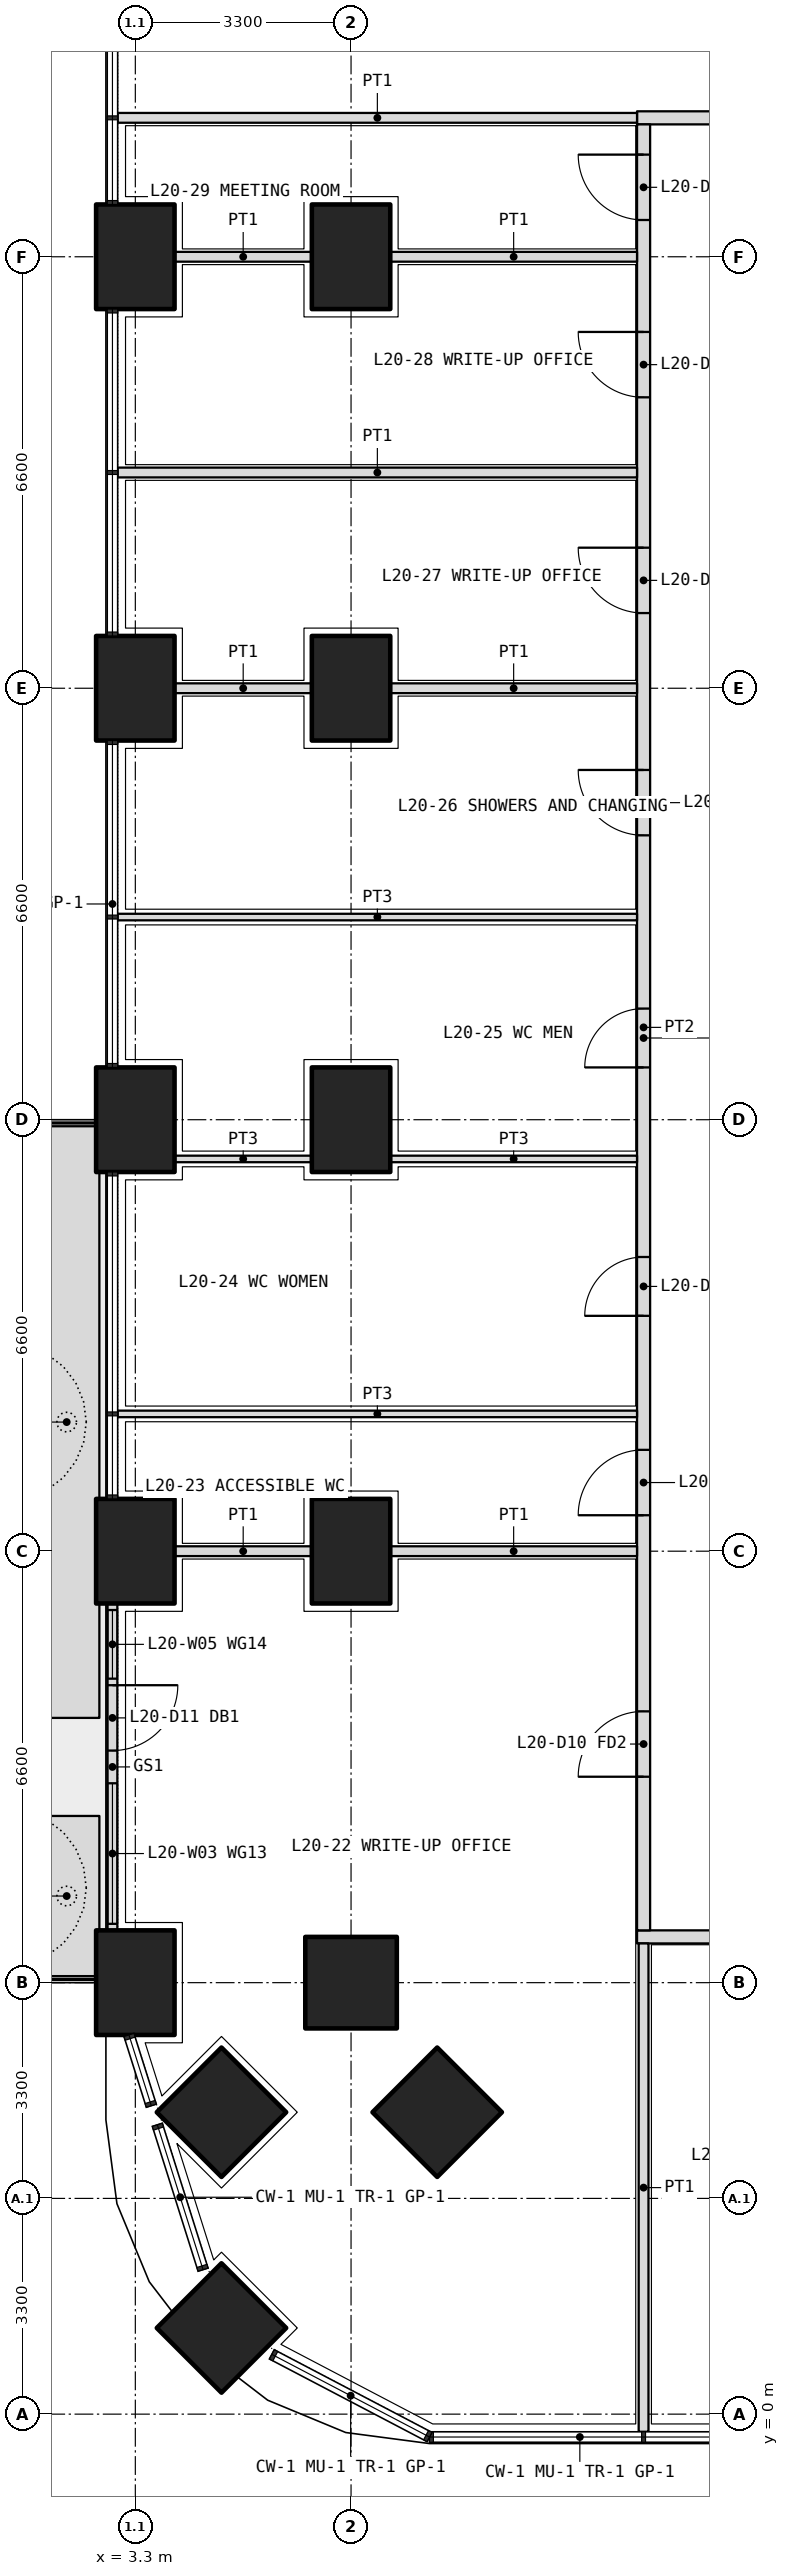
"""IFC4 building model, lengths in metres.
Left out: names, types, materials, properties, quantities, classifications, styles, units other than length and angle.
Written with IfcOpenShell. Run it as: python <this file> out.ifc"""

import sys

from ifc_helpers import new_model, si_unit, direction, frame, frame_2d, origin, origin_2d, place, context, subcontext, project, spatial, polyline, rectangle, outline, extrude, element, fill, save


model = new_model("IFC4")
c1 = context("Model", 3, precision=1e-05, world=origin(), true_north=direction((0.0, 1.0)))
c2 = subcontext(c1, "Body", "Model", "MODEL_VIEW")
j1 = project(units=[si_unit("LENGTHUNIT", "METRE"), si_unit("PLANEANGLEUNIT", "RADIAN")], contexts=[c1])
p1 = place(None, origin())
s1 = spatial("IfcSite", under=j1, at=p1, CompositionType="ELEMENT")
p2 = place(p1, origin())
s2 = spatial("IfcBuilding", under=s1, at=p2, CompositionType="ELEMENT")
p3 = place(p2, frame((0.0, 0.0, 90.6)))
s3 = spatial("IfcBuildingStorey", under=s2, at=p3, CompositionType="ELEMENT", Elevation=90.6)
p4 = place(p3, frame((4.618, 1.318, 0.0), z_axis=(0.0, 0.0, 1.0), x_axis=(0.707106781187, 0.707106781187, 0.0)))
e1 = element("IfcColumn", 1, at=p4, inside=s3, PredefinedType="COLUMN", context=c2, shape_type="SweptSolid", body=[
    extrude(rectangle(XDim=1.4, YDim=1.4, at=origin_2d()), origin(), (0.0, 0.0, 1.0), 4.2),
])
for number, where, z_axis, x_axis in (
    (2, (3.3, 6.6, 0.0), (0.0, 0.0, 1.0), (0.0, 1.0, 0.0)),
    (3, (3.3, 13.2, 0.0), (0.0, 0.0, 1.0), (0.0, 1.0, 0.0)),
    (4, (3.3, 19.8, 0.0), (0.0, 0.0, 1.0), (0.0, 1.0, 0.0)),
    (5, (3.3, 26.4, 0.0), (0.0, 0.0, 1.0), (0.0, 1.0, 0.0)),
    (6, (3.3, 33.0, 0.0), (0.0, 0.0, 1.0), (0.0, 1.0, 0.0)),
):
    element("IfcColumn", number, at=place(p3, frame(where, z_axis=z_axis, x_axis=x_axis)), inside=s3, PredefinedType="COLUMN", context=c2, shape_type="SweptSolid", body=[
        extrude(rectangle(XDim=1.6, YDim=1.2, at=origin_2d()), origin(), (0.0, 0.0, 1.0), 4.2),
    ])
for number, where, z_axis, x_axis in (
    (7, (6.6, 6.6, 0.0), (0.0, 0.0, 1.0), (1.0, 0.0, 0.0)),
    (8, (4.618, 4.618, 0.0), (0.0, 0.0, 1.0), (0.707, 0.707, 0.0)),
    (9, (7.918, 4.618, 0.0), (0.0, 0.0, 1.0), (0.707, 0.707, 0.0)),
):
    element("IfcColumn", number, at=place(p3, frame(where, z_axis=z_axis, x_axis=x_axis)), inside=s3, PredefinedType="COLUMN", context=c2, shape_type="SweptSolid", body=[
        extrude(rectangle(XDim=1.4, YDim=1.4, at=origin_2d()), origin(), (0.0, 0.0, 1.0), 4.2),
    ])
for number, where, z_axis, x_axis in (
    (10, (6.6, 13.2, 0.0), (0.0, 0.0, 1.0), (0.0, 1.0, 0.0)),
    (11, (6.6, 19.8, 0.0), (0.0, 0.0, 1.0), (0.0, 1.0, 0.0)),
    (12, (6.6, 26.4, 0.0), (0.0, 0.0, 1.0), (0.0, 1.0, 0.0)),
    (13, (6.6, 33.0, 0.0), (0.0, 0.0, 1.0), (0.0, 1.0, 0.0)),
):
    element("IfcColumn", number, at=place(p3, frame(where, z_axis=z_axis, x_axis=x_axis)), inside=s3, PredefinedType="COLUMN", context=c2, shape_type="SweptSolid", body=[
        extrude(rectangle(XDim=1.6, YDim=1.2, at=origin_2d()), origin(), (0.0, 0.0, 1.0), 4.2),
    ])
p5 = place(p3, origin())
e14 = element("IfcWall", 14, at=p5, inside=s3, PredefinedType="USERDEFINED", context=c2, shape_type="SweptSolid", body=[
    extrude(outline(polyline([(1.75, 6.7), (2.75, 6.7), (2.75, 9.15), (1.75, 9.15), (1.75, 6.7)]), holes=[polyline([(1.9, 6.85), (2.6, 6.85), (2.6, 9.0), (1.9, 9.0), (1.9, 6.85)])]), origin(), (0.0, 0.0, 1.0), 1.05),
])
p6 = place(p3, origin())
e15 = element("IfcWall", 15, at=p6, inside=s3, PredefinedType="USERDEFINED", context=c2, shape_type="SweptSolid", body=[
    extrude(outline(polyline([(1.75, 10.65), (2.75, 10.65), (2.75, 19.7), (1.75, 19.7), (1.75, 10.65)]), holes=[polyline([(1.9, 10.8), (2.6, 10.8), (2.6, 19.55), (1.9, 19.55), (1.9, 10.8)])]), origin(), (0.0, 0.0, 1.0), 1.05),
])
p7 = place(p3, frame((2.95, 12.4, 0.0), z_axis=(0.0, 0.0, 1.0), x_axis=(0.0, -1.0, 0.0)))
e16 = element("IfcWall", 16, at=p7, inside=s3, PredefinedType="SOLIDWALL", context=c2, shape_type="SweptSolid", body=[
    extrude(rectangle(XDim=5.0, YDim=0.15, at=frame_2d((2.5, 0.0))), origin(), (0.0, 0.0, 1.0), 2.7),
])
p8 = place(p7, frame((1.25, 0.0, 0.0)))
e17 = element("IfcOpeningElement", 17, at=p8, cuts=e16, PredefinedType="OPENING", context=c2, shape_type="SweptSolid", body=[
    extrude(rectangle(XDim=1.0, YDim=2.4, at=frame_2d((0.5, 1.2))), frame((0.0, 0.085, 0.0), z_axis=(0.0, -1.0, 0.0), x_axis=(1.0, 0.0, 0.0)), (0.0, 0.0, 1.0), 0.17),
])
p9 = place(p7, frame((0.1, 0.0, 0.1)))
e18 = element("IfcOpeningElement", 18, at=p9, cuts=e16, PredefinedType="OPENING", context=c2, shape_type="SweptSolid", body=[
    extrude(rectangle(XDim=1.05, YDim=2.3, at=frame_2d((0.525, 1.15))), frame((0.0, 0.085, 0.0), z_axis=(0.0, -1.0, 0.0), x_axis=(1.0, 0.0, 0.0)), (0.0, 0.0, 1.0), 0.17),
])
p10 = place(p7, frame((2.75, 0.0, 0.1)))
e19 = element("IfcOpeningElement", 19, at=p10, cuts=e16, PredefinedType="OPENING", context=c2, shape_type="SweptSolid", body=[
    extrude(rectangle(XDim=2.15, YDim=2.3, at=frame_2d((1.075, 1.15))), frame((0.0, 0.085, 0.0), z_axis=(0.0, -1.0, 0.0), x_axis=(1.0, 0.0, 0.0)), (0.0, 0.0, 1.0), 0.17),
])
p11 = place(p3, frame((10.975, 7.3, 0.0), z_axis=(0.0, 0.0, 1.0), x_axis=(1.0, 0.0, 0.0)))
e20 = element("IfcWall", 20, at=p11, inside=s3, PredefinedType="PARTITIONING", context=c2, shape_type="SweptSolid", body=[
    extrude(rectangle(XDim=12.125, YDim=0.2, at=frame_2d((6.062, 0.0))), origin(), (0.0, 0.0, 1.0), 2.85),
])
p12 = place(p11, frame((2.312, 0.0, 0.0)))
e21 = element("IfcOpeningElement", 21, at=p12, cuts=e20, PredefinedType="OPENING", context=c2, shape_type="SweptSolid", body=[
    extrude(rectangle(XDim=1.0, YDim=2.1, at=frame_2d((0.5, 1.05))), frame((0.0, 0.11, 0.0), z_axis=(0.0, -1.0, 0.0), x_axis=(1.0, 0.0, 0.0)), (0.0, 0.0, 1.0), 0.22),
])
p13 = place(p11, frame((7.125, 0.0, 0.0)))
e22 = element("IfcOpeningElement", 22, at=p13, cuts=e20, PredefinedType="OPENING", context=c2, shape_type="SweptSolid", body=[
    extrude(rectangle(XDim=1.0, YDim=2.1, at=frame_2d((0.5, 1.05))), frame((0.0, 0.11, 0.0), z_axis=(0.0, -1.0, 0.0), x_axis=(1.0, 0.0, 0.0)), (0.0, 0.0, 1.0), 0.22),
])
p14 = place(p11, frame((10.425, 0.0, 0.0)))
e23 = element("IfcOpeningElement", 23, at=p14, cuts=e20, PredefinedType="OPENING", context=c2, shape_type="SweptSolid", body=[
    extrude(rectangle(XDim=1.0, YDim=2.1, at=frame_2d((0.5, 1.05))), frame((0.0, 0.11, 0.0), z_axis=(0.0, -1.0, 0.0), x_axis=(1.0, 0.0, 0.0)), (0.0, 0.0, 1.0), 0.22),
])
p15 = place(p3, frame((10.975, 35.125, 0.0), z_axis=(0.0, 0.0, 1.0), x_axis=(1.0, 0.0, 0.0)))
e24 = element("IfcWall", 24, at=p15, inside=s3, PredefinedType="PARTITIONING", context=c2, shape_type="SweptSolid", body=[
    extrude(rectangle(XDim=30.85, YDim=0.2, at=frame_2d((15.425, 0.0))), origin(), (0.0, 0.0, 1.0), 2.85),
])
p16 = place(p15, frame((3.962, 0.0, 0.0)))
e25 = element("IfcOpeningElement", 25, at=p16, cuts=e24, PredefinedType="OPENING", context=c2, shape_type="SweptSolid", body=[
    extrude(rectangle(XDim=1.0, YDim=2.1, at=frame_2d((0.5, 1.05))), frame((0.0, 0.11, 0.0), z_axis=(0.0, -1.0, 0.0), x_axis=(1.0, 0.0, 0.0)), (0.0, 0.0, 1.0), 0.22),
])
p17 = place(p15, frame((9.975, 0.0, 0.0)))
e26 = element("IfcOpeningElement", 26, at=p17, cuts=e24, PredefinedType="OPENING", context=c2, shape_type="SweptSolid", body=[
    extrude(rectangle(XDim=1.0, YDim=2.1, at=frame_2d((0.5, 1.05))), frame((0.0, 0.11, 0.0), z_axis=(0.0, -1.0, 0.0), x_axis=(1.0, 0.0, 0.0)), (0.0, 0.0, 1.0), 0.22),
])
p18 = place(p15, frame((14.825, 0.0, 0.0)))
e27 = element("IfcOpeningElement", 27, at=p18, cuts=e24, PredefinedType="OPENING", context=c2, shape_type="SweptSolid", body=[
    extrude(rectangle(XDim=1.2, YDim=2.1, at=frame_2d((0.6, 1.05))), frame((0.0, 0.11, 0.0), z_axis=(0.0, -1.0, 0.0), x_axis=(1.0, 0.0, 0.0)), (0.0, 0.0, 1.0), 0.22),
])
p19 = place(p15, frame((24.238, 0.0, 0.0)))
e28 = element("IfcOpeningElement", 28, at=p19, cuts=e24, PredefinedType="OPENING", context=c2, shape_type="SweptSolid", body=[
    extrude(rectangle(XDim=1.0, YDim=2.1, at=frame_2d((0.5, 1.05))), frame((0.0, 0.11, 0.0), z_axis=(0.0, -1.0, 0.0), x_axis=(1.0, 0.0, 0.0)), (0.0, 0.0, 1.0), 0.22),
])
p20 = place(p3, frame((11.075, 7.4, 0.0), z_axis=(0.0, 0.0, 1.0), x_axis=(0.0, 1.0, 0.0)))
e29 = element("IfcWall", 29, at=p20, inside=s3, PredefinedType="PARTITIONING", context=c2, shape_type="SweptSolid", body=[
    extrude(rectangle(XDim=27.625, YDim=0.2, at=frame_2d((13.812, 0.0))), origin(), (0.0, 0.0, 1.0), 2.85),
])
p21 = place(p20, frame((2.35, 0.0, 0.0)))
e30 = element("IfcOpeningElement", 30, at=p21, cuts=e29, PredefinedType="OPENING", context=c2, shape_type="SweptSolid", body=[
    extrude(rectangle(XDim=1.0, YDim=2.1, at=frame_2d((0.5, 1.05))), frame((0.0, 0.11, 0.0), z_axis=(0.0, -1.0, 0.0), x_axis=(1.0, 0.0, 0.0)), (0.0, 0.0, 1.0), 0.22),
])
p22 = place(p20, frame((6.35, 0.0, 0.0)))
e31 = element("IfcOpeningElement", 31, at=p22, cuts=e29, PredefinedType="OPENING", context=c2, shape_type="SweptSolid", body=[
    extrude(rectangle(XDim=1.0, YDim=2.1, at=frame_2d((0.5, 1.05))), frame((0.0, 0.11, 0.0), z_axis=(0.0, -1.0, 0.0), x_axis=(1.0, 0.0, 0.0)), (0.0, 0.0, 1.0), 0.22),
])
p23 = place(p20, frame((9.4, 0.0, 0.0)))
e32 = element("IfcOpeningElement", 32, at=p23, cuts=e29, PredefinedType="OPENING", context=c2, shape_type="SweptSolid", body=[
    extrude(rectangle(XDim=0.9, YDim=2.1, at=frame_2d((0.45, 1.05))), frame((0.0, 0.11, 0.0), z_axis=(0.0, -1.0, 0.0), x_axis=(1.0, 0.0, 0.0)), (0.0, 0.0, 1.0), 0.22),
])
p24 = place(p20, frame((13.2, 0.0, 0.0)))
e33 = element("IfcOpeningElement", 33, at=p24, cuts=e29, PredefinedType="OPENING", context=c2, shape_type="SweptSolid", body=[
    extrude(rectangle(XDim=0.9, YDim=2.1, at=frame_2d((0.45, 1.05))), frame((0.0, 0.11, 0.0), z_axis=(0.0, -1.0, 0.0), x_axis=(1.0, 0.0, 0.0)), (0.0, 0.0, 1.0), 0.22),
])
p25 = place(p20, frame((16.75, 0.0, 0.0)))
e34 = element("IfcOpeningElement", 34, at=p25, cuts=e29, PredefinedType="OPENING", context=c2, shape_type="SweptSolid", body=[
    extrude(rectangle(XDim=1.0, YDim=2.1, at=frame_2d((0.5, 1.05))), frame((0.0, 0.11, 0.0), z_axis=(0.0, -1.0, 0.0), x_axis=(1.0, 0.0, 0.0)), (0.0, 0.0, 1.0), 0.22),
])
p26 = place(p20, frame((20.15, 0.0, 0.0)))
e35 = element("IfcOpeningElement", 35, at=p26, cuts=e29, PredefinedType="OPENING", context=c2, shape_type="SweptSolid", body=[
    extrude(rectangle(XDim=1.0, YDim=2.1, at=frame_2d((0.5, 1.05))), frame((0.0, 0.11, 0.0), z_axis=(0.0, -1.0, 0.0), x_axis=(1.0, 0.0, 0.0)), (0.0, 0.0, 1.0), 0.22),
])
p27 = place(p20, frame((23.45, 0.0, 0.0)))
e36 = element("IfcOpeningElement", 36, at=p27, cuts=e29, PredefinedType="OPENING", context=c2, shape_type="SweptSolid", body=[
    extrude(rectangle(XDim=1.0, YDim=2.1, at=frame_2d((0.5, 1.05))), frame((0.0, 0.11, 0.0), z_axis=(0.0, -1.0, 0.0), x_axis=(1.0, 0.0, 0.0)), (0.0, 0.0, 1.0), 0.22),
])
p28 = place(p20, frame((26.163, 0.0, 0.0)))
e37 = element("IfcOpeningElement", 37, at=p28, cuts=e29, PredefinedType="OPENING", context=c2, shape_type="SweptSolid", body=[
    extrude(rectangle(XDim=1.0, YDim=2.1, at=frame_2d((0.5, 1.05))), frame((0.0, 0.11, 0.0), z_axis=(0.0, -1.0, 0.0), x_axis=(1.0, 0.0, 0.0)), (0.0, 0.0, 1.0), 0.22),
])
p29 = place(p3, frame((11.075, -0.27, 0.0), z_axis=(0.0, 0.0, 1.0), x_axis=(0.0, 1.0, 0.0)))
e38 = element("IfcWall", 38, at=p29, inside=s3, PredefinedType="PARTITIONING", context=c2, shape_type="SweptSolid", body=[
    extrude(rectangle(XDim=7.47, YDim=0.15, at=frame_2d((3.735, 0.0))), origin(), (0.0, 0.0, 1.0), 2.7),
])
p30 = place(p3, frame((3.03, 35.125, 0.0), z_axis=(0.0, 0.0, 1.0), x_axis=(1.0, 0.0, 0.0)))
e39 = element("IfcWall", 39, at=p30, inside=s3, PredefinedType="PARTITIONING", context=c2, shape_type="SweptSolid", body=[
    extrude(rectangle(XDim=7.945, YDim=0.15, at=frame_2d((3.973, 0.0))), origin(), (0.0, 0.0, 1.0), 2.7),
])
p31 = place(p3, frame((3.03, 15.3, 0.0), z_axis=(0.0, 0.0, 1.0), x_axis=(1.0, 0.0, 0.0)))
e40 = element("IfcWall", 40, at=p31, inside=s3, PredefinedType="PARTITIONING", context=c2, shape_type="SweptSolid", body=[
    extrude(rectangle(XDim=7.945, YDim=0.1, at=frame_2d((3.973, 0.0))), origin(), (0.0, 0.0, 1.0), 2.7),
])
p32 = place(p3, frame((3.9, 19.2, 0.0), z_axis=(0.0, 0.0, 1.0), x_axis=(1.0, 0.0, 0.0)))
e41 = element("IfcWall", 41, at=p32, inside=s3, PredefinedType="PARTITIONING", context=c2, shape_type="SweptSolid", body=[
    extrude(rectangle(XDim=2.1, YDim=0.1, at=frame_2d((1.05, 0.0))), origin(), (0.0, 0.0, 1.0), 2.85),
])
p33 = place(p3, frame((7.2, 19.2, 0.0), z_axis=(0.0, 0.0, 1.0), x_axis=(1.0, 0.0, 0.0)))
e42 = element("IfcWall", 42, at=p33, inside=s3, PredefinedType="PARTITIONING", context=c2, shape_type="SweptSolid", body=[
    extrude(rectangle(XDim=3.775, YDim=0.1, at=frame_2d((1.888, 0.0))), origin(), (0.0, 0.0, 1.0), 2.85),
])
p34 = place(p3, frame((3.03, 22.9, 0.0), z_axis=(0.0, 0.0, 1.0), x_axis=(1.0, 0.0, 0.0)))
e43 = element("IfcWall", 43, at=p34, inside=s3, PredefinedType="PARTITIONING", context=c2, shape_type="SweptSolid", body=[
    extrude(rectangle(XDim=7.945, YDim=0.1, at=frame_2d((3.973, 0.0))), origin(), (0.0, 0.0, 1.0), 2.7),
])
p35 = place(p3, frame((3.9, 13.2, 0.0), z_axis=(0.0, 0.0, 1.0), x_axis=(1.0, 0.0, 0.0)))
e44 = element("IfcWall", 44, at=p35, inside=s3, PredefinedType="PARTITIONING", context=c2, shape_type="SweptSolid", body=[
    extrude(rectangle(XDim=2.1, YDim=0.15, at=frame_2d((1.05, 0.0))), origin(), (0.0, 0.0, 1.0), 2.85),
])
p36 = place(p3, frame((7.2, 13.2, 0.0), z_axis=(0.0, 0.0, 1.0), x_axis=(1.0, 0.0, 0.0)))
e45 = element("IfcWall", 45, at=p36, inside=s3, PredefinedType="PARTITIONING", context=c2, shape_type="SweptSolid", body=[
    extrude(rectangle(XDim=3.775, YDim=0.15, at=frame_2d((1.888, 0.0))), origin(), (0.0, 0.0, 1.0), 2.85),
])
p37 = place(p3, frame((3.9, 26.4, 0.0), z_axis=(0.0, 0.0, 1.0), x_axis=(1.0, 0.0, 0.0)))
e46 = element("IfcWall", 46, at=p37, inside=s3, PredefinedType="PARTITIONING", context=c2, shape_type="SweptSolid", body=[
    extrude(rectangle(XDim=2.1, YDim=0.15, at=frame_2d((1.05, 0.0))), origin(), (0.0, 0.0, 1.0), 2.85),
])
p38 = place(p3, frame((7.2, 26.4, 0.0), z_axis=(0.0, 0.0, 1.0), x_axis=(1.0, 0.0, 0.0)))
e47 = element("IfcWall", 47, at=p38, inside=s3, PredefinedType="PARTITIONING", context=c2, shape_type="SweptSolid", body=[
    extrude(rectangle(XDim=3.775, YDim=0.15, at=frame_2d((1.888, 0.0))), origin(), (0.0, 0.0, 1.0), 2.85),
])
p39 = place(p3, frame((3.03, 29.7, 0.0), z_axis=(0.0, 0.0, 1.0), x_axis=(1.0, 0.0, 0.0)))
e48 = element("IfcWall", 48, at=p39, inside=s3, PredefinedType="PARTITIONING", context=c2, shape_type="SweptSolid", body=[
    extrude(rectangle(XDim=7.945, YDim=0.15, at=frame_2d((3.973, 0.0))), origin(), (0.0, 0.0, 1.0), 2.7),
])
p40 = place(p3, frame((3.9, 33.0, 0.0), z_axis=(0.0, 0.0, 1.0), x_axis=(1.0, 0.0, 0.0)))
e49 = element("IfcWall", 49, at=p40, inside=s3, PredefinedType="PARTITIONING", context=c2, shape_type="SweptSolid", body=[
    extrude(rectangle(XDim=2.1, YDim=0.15, at=frame_2d((1.05, 0.0))), origin(), (0.0, 0.0, 1.0), 2.85),
])
p41 = place(p3, frame((7.2, 33.0, 0.0), z_axis=(0.0, 0.0, 1.0), x_axis=(1.0, 0.0, 0.0)))
e50 = element("IfcWall", 50, at=p41, inside=s3, PredefinedType="PARTITIONING", context=c2, shape_type="SweptSolid", body=[
    extrude(rectangle(XDim=3.775, YDim=0.15, at=frame_2d((1.888, 0.0))), origin(), (0.0, 0.0, 1.0), 2.85),
])
p42 = place(p8, origin())
e51 = element("IfcDoor", 51, at=p42, inside=s3, OperationType="SINGLE_SWING_LEFT", PredefinedType="DOOR", context=c2, shape_type="SweptSolid", body=[
    extrude(rectangle(XDim=1.0, YDim=2.4, at=frame_2d((0.5, 1.2))), frame((0.0, 0.025, 0.0), z_axis=(0.0, -1.0, 0.0), x_axis=(1.0, 0.0, 0.0)), (0.0, 0.0, 1.0), 0.05),
])
fill(e17, e51)
p43 = place(p9, origin())
e52 = element("IfcWindow", 52, at=p43, inside=s3, PartitioningType="SINGLE_PANEL", PredefinedType="WINDOW", context=c2, shape_type="SweptSolid", body=[
    extrude(rectangle(XDim=1.05, YDim=2.3, at=frame_2d((0.525, 1.15))), frame((0.0, 0.03, 0.0), z_axis=(0.0, -1.0, 0.0), x_axis=(1.0, 0.0, 0.0)), (0.0, 0.0, 1.0), 0.06),
])
fill(e18, e52)
p44 = place(p10, origin())
e53 = element("IfcWindow", 53, at=p44, inside=s3, PartitioningType="SINGLE_PANEL", PredefinedType="WINDOW", context=c2, shape_type="SweptSolid", body=[
    extrude(rectangle(XDim=2.15, YDim=2.3, at=frame_2d((1.075, 1.15))), frame((0.0, 0.03, 0.0), z_axis=(0.0, -1.0, 0.0), x_axis=(1.0, 0.0, 0.0)), (0.0, 0.0, 1.0), 0.06),
])
fill(e19, e53)
p45 = place(p21, origin())
e54 = element("IfcDoor", 54, at=p45, inside=s3, OperationType="SINGLE_SWING_LEFT", PredefinedType="DOOR", context=c2, shape_type="SweptSolid", body=[
    extrude(rectangle(XDim=1.0, YDim=2.1, at=frame_2d((0.5, 1.05))), frame((0.0, 0.025, 0.0), z_axis=(0.0, -1.0, 0.0), x_axis=(1.0, 0.0, 0.0)), (0.0, 0.0, 1.0), 0.05),
])
fill(e30, e54)
p46 = place(p22, origin())
e55 = element("IfcDoor", 55, at=p46, inside=s3, OperationType="SINGLE_SWING_LEFT", PredefinedType="DOOR", context=c2, shape_type="SweptSolid", body=[
    extrude(rectangle(XDim=1.0, YDim=2.1, at=frame_2d((0.5, 1.05))), frame((0.0, 0.025, 0.0), z_axis=(0.0, -1.0, 0.0), x_axis=(1.0, 0.0, 0.0)), (0.0, 0.0, 1.0), 0.05),
])
fill(e31, e55)
p47 = place(p23, origin())
e56 = element("IfcDoor", 56, at=p47, inside=s3, OperationType="SINGLE_SWING_LEFT", PredefinedType="DOOR", context=c2, shape_type="SweptSolid", body=[
    extrude(rectangle(XDim=0.9, YDim=2.1, at=frame_2d((0.45, 1.05))), frame((0.0, 0.025, 0.0), z_axis=(0.0, -1.0, 0.0), x_axis=(1.0, 0.0, 0.0)), (0.0, 0.0, 1.0), 0.05),
])
fill(e32, e56)
p48 = place(p24, origin())
e57 = element("IfcDoor", 57, at=p48, inside=s3, OperationType="SINGLE_SWING_LEFT", PredefinedType="DOOR", context=c2, shape_type="SweptSolid", body=[
    extrude(rectangle(XDim=0.9, YDim=2.1, at=frame_2d((0.45, 1.05))), frame((0.0, 0.025, 0.0), z_axis=(0.0, -1.0, 0.0), x_axis=(1.0, 0.0, 0.0)), (0.0, 0.0, 1.0), 0.05),
])
fill(e33, e57)
p49 = place(p25, origin())
e58 = element("IfcDoor", 58, at=p49, inside=s3, OperationType="SINGLE_SWING_RIGHT", PredefinedType="DOOR", context=c2, shape_type="SweptSolid", body=[
    extrude(rectangle(XDim=1.0, YDim=2.1, at=frame_2d((0.5, 1.05))), frame((0.0, 0.025, 0.0), z_axis=(0.0, -1.0, 0.0), x_axis=(1.0, 0.0, 0.0)), (0.0, 0.0, 1.0), 0.05),
])
fill(e34, e58)
p50 = place(p26, origin())
e59 = element("IfcDoor", 59, at=p50, inside=s3, OperationType="SINGLE_SWING_RIGHT", PredefinedType="DOOR", context=c2, shape_type="SweptSolid", body=[
    extrude(rectangle(XDim=1.0, YDim=2.1, at=frame_2d((0.5, 1.05))), frame((0.0, 0.025, 0.0), z_axis=(0.0, -1.0, 0.0), x_axis=(1.0, 0.0, 0.0)), (0.0, 0.0, 1.0), 0.05),
])
fill(e35, e59)
p51 = place(p27, origin())
e60 = element("IfcDoor", 60, at=p51, inside=s3, OperationType="SINGLE_SWING_RIGHT", PredefinedType="DOOR", context=c2, shape_type="SweptSolid", body=[
    extrude(rectangle(XDim=1.0, YDim=2.1, at=frame_2d((0.5, 1.05))), frame((0.0, 0.025, 0.0), z_axis=(0.0, -1.0, 0.0), x_axis=(1.0, 0.0, 0.0)), (0.0, 0.0, 1.0), 0.05),
])
fill(e36, e60)
p52 = place(p28, origin())
e61 = element("IfcDoor", 61, at=p52, inside=s3, OperationType="SINGLE_SWING_RIGHT", PredefinedType="DOOR", context=c2, shape_type="SweptSolid", body=[
    extrude(rectangle(XDim=1.0, YDim=2.1, at=frame_2d((0.5, 1.05))), frame((0.0, 0.025, 0.0), z_axis=(0.0, -1.0, 0.0), x_axis=(1.0, 0.0, 0.0)), (0.0, 0.0, 1.0), 0.05),
])
fill(e37, e61)
save(model, sys.argv[1])
